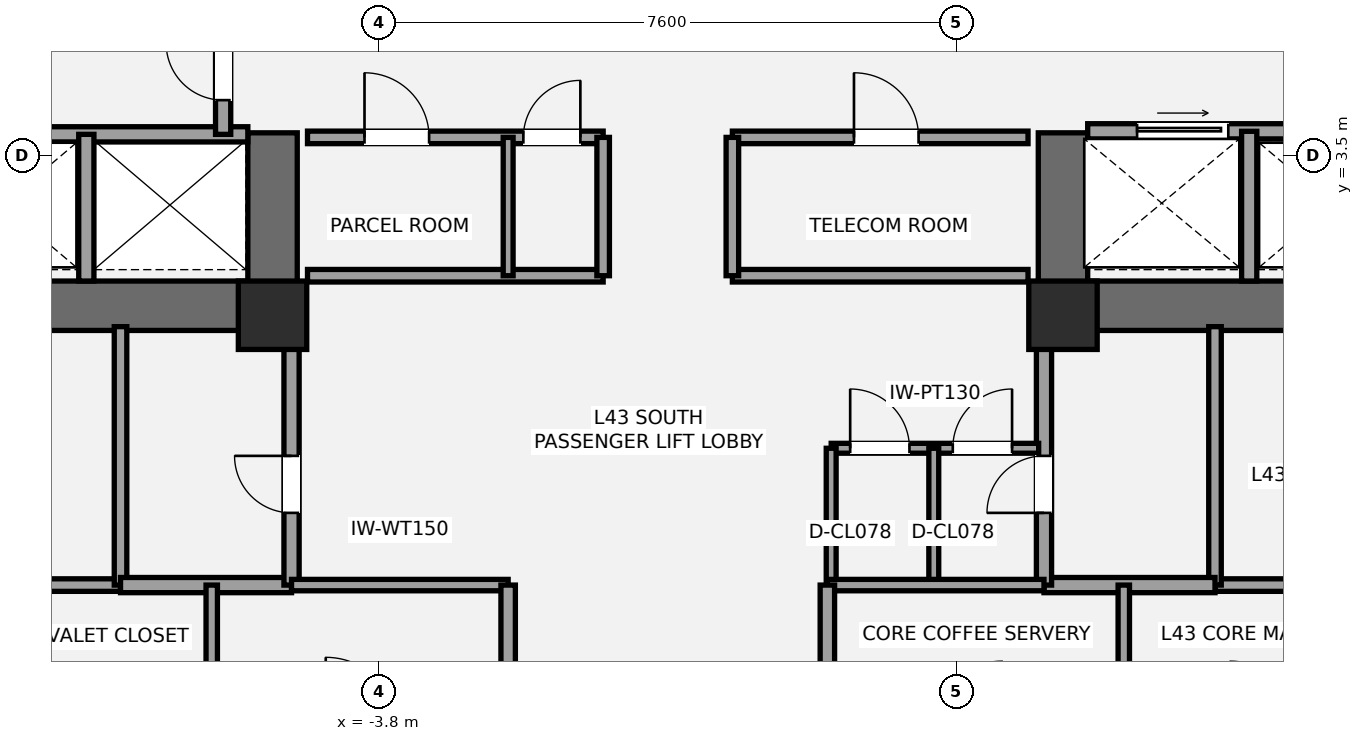
"""IFC4 building model, lengths in metres.
Left out: names, types, materials, properties, quantities, classifications, styles, units other than length and angle.
Written with IfcOpenShell. Run it as: python <this file> out.ifc"""

import sys

from ifc_helpers import new_model, si_unit, direction, frame, frame_2d, origin, origin_2d, place, context, subcontext, project, spatial, rectangle, extrude, element, fill, save


model = new_model("IFC4")
c1 = context("Model", 3, precision=1e-05, world=origin(), true_north=direction((0.0, 1.0)))
c2 = subcontext(c1, "Body", "Model", "MODEL_VIEW")
j1 = project(units=[si_unit("LENGTHUNIT", "METRE"), si_unit("PLANEANGLEUNIT", "RADIAN")], contexts=[c1])
p1 = place(None, origin())
s1 = spatial("IfcSite", under=j1, at=p1, CompositionType="ELEMENT")
p2 = place(p1, origin())
s2 = spatial("IfcBuilding", under=s1, at=p2, CompositionType="ELEMENT")
p3 = place(p2, frame((0.0, 0.0, 159.8)))
s3 = spatial("IfcBuildingStorey", under=s2, at=p3, CompositionType="ELEMENT", Elevation=159.8)
p4 = place(p3, frame((-4.875, 1.525, 0.0), z_axis=(0.0, 0.0, 1.0), x_axis=(-1.0, 0.0, 0.0)))
e1 = element("IfcWall", 1, at=p4, inside=s3, PredefinedType="SHEAR", context=c2, shape_type="SweptSolid", body=[
    extrude(rectangle(XDim=8.925, YDim=0.65, at=frame_2d((4.462, 0.0))), origin(), (0.0, 0.0, 1.0), 3.2),
])
p5 = place(p4, frame((5.425, 0.0, 0.0)))
e2 = element("IfcOpeningElement", 2, at=p5, cuts=e1, PredefinedType="OPENING", context=c2, shape_type="SweptSolid", body=[
    extrude(rectangle(XDim=1.05, YDim=2.15, at=frame_2d((0.525, 1.075))), frame((0.0, 0.335, 0.0), z_axis=(0.0, -1.0, 0.0), x_axis=(1.0, 0.0, 0.0)), (0.0, 0.0, 1.0), 0.67),
])
p6 = place(p4, frame((3.755, 0.0, 0.0)))
e3 = element("IfcOpeningElement", 3, at=p6, cuts=e1, PredefinedType="OPENING", context=c2, shape_type="SweptSolid", body=[
    extrude(rectangle(XDim=1.1, YDim=2.2, at=frame_2d((0.55, 1.1))), frame((0.0, 0.335, 0.0), z_axis=(0.0, -1.0, 0.0), x_axis=(1.0, 0.0, 0.0)), (0.0, 0.0, 1.0), 0.67),
])
p7 = place(p3, frame((-5.2, 1.2, 0.0), z_axis=(0.0, 0.0, 1.0), x_axis=(0.0, 1.0, 0.0)))
e4 = element("IfcWall", 4, at=p7, inside=s3, PredefinedType="SHEAR", context=c2, shape_type="SweptSolid", body=[
    extrude(rectangle(XDim=2.6, YDim=0.65, at=frame_2d((1.3, 0.0))), origin(), (0.0, 0.0, 1.0), 3.2),
])
p8 = place(p3, frame((13.8, 1.525, 0.0), z_axis=(0.0, 0.0, 1.0), x_axis=(-1.0, 0.0, 0.0)))
e5 = element("IfcWall", 5, at=p8, inside=s3, PredefinedType="SHEAR", context=c2, shape_type="SweptSolid", body=[
    extrude(rectangle(XDim=8.925, YDim=0.65, at=frame_2d((4.462, 0.0))), origin(), (0.0, 0.0, 1.0), 3.2),
])
p9 = place(p8, frame((2.45, 0.0, 0.0)))
e6 = element("IfcOpeningElement", 6, at=p9, cuts=e5, PredefinedType="OPENING", context=c2, shape_type="SweptSolid", body=[
    extrude(rectangle(XDim=1.05, YDim=2.15, at=frame_2d((0.525, 1.075))), frame((0.0, 0.335, 0.0), z_axis=(0.0, -1.0, 0.0), x_axis=(1.0, 0.0, 0.0)), (0.0, 0.0, 1.0), 0.67),
])
p10 = place(p8, frame((4.45, 0.0, 0.0)))
e7 = element("IfcOpeningElement", 7, at=p10, cuts=e5, PredefinedType="OPENING", context=c2, shape_type="SweptSolid", body=[
    extrude(rectangle(XDim=1.1, YDim=2.2, at=frame_2d((0.55, 1.1))), frame((0.0, 0.335, 0.0), z_axis=(0.0, -1.0, 0.0), x_axis=(1.0, 0.0, 0.0)), (0.0, 0.0, 1.0), 0.67),
])
p11 = place(p3, frame((5.2, 1.2, 0.0), z_axis=(0.0, 0.0, 1.0), x_axis=(0.0, 1.0, 0.0)))
e8 = element("IfcWall", 8, at=p11, inside=s3, PredefinedType="SHEAR", context=c2, shape_type="SweptSolid", body=[
    extrude(rectangle(XDim=2.6, YDim=0.65, at=frame_2d((1.3, 0.0))), origin(), (0.0, 0.0, 1.0), 3.2),
])
for number, where, z_axis, x_axis in (
    (9, (-5.2, 1.4, 0.0), (0.0, 0.0, 1.0), (1.0, 0.0, 0.0)),
    (10, (5.2, 1.4, 0.0), (0.0, 0.0, 1.0), (1.0, 0.0, 0.0)),
):
    element("IfcColumn", number, at=place(p3, frame(where, z_axis=z_axis, x_axis=x_axis)), inside=s3, PredefinedType="COLUMN", context=c2, shape_type="SweptSolid", body=[
        extrude(rectangle(XDim=0.9, YDim=0.9, at=origin_2d()), origin(), (0.0, 0.0, 1.0), 3.2),
    ])
p12 = place(p3, frame((-13.45, -2.15, 0.0), z_axis=(0.0, 0.0, 1.0), x_axis=(1.0, 0.0, 0.0)))
e11 = element("IfcWall", 11, at=p12, inside=s3, PredefinedType="PARTITIONING", context=c2, shape_type="SweptSolid", body=[
    extrude(rectangle(XDim=6.25, YDim=0.165, at=frame_2d((3.125, 0.0))), origin(), (0.0, 0.0, 1.0), 3.02),
])
p13 = place(p3, frame((-7.2, -2.15, 0.0), z_axis=(0.0, 0.0, 1.0), x_axis=(0.0, 1.0, 0.0)))
e12 = element("IfcWall", 12, at=p13, inside=s3, PredefinedType="PARTITIONING", context=c2, shape_type="SweptSolid", body=[
    extrude(rectangle(XDim=3.4, YDim=0.165, at=frame_2d((1.7, 0.0))), origin(), (0.0, 0.0, 1.0), 2.473),
])
p14 = place(p3, frame((-7.2, -2.15, 0.0), z_axis=(0.0, 0.0, 1.0), x_axis=(1.0, 0.0, 0.0)))
e13 = element("IfcWall", 13, at=p14, inside=s3, PredefinedType="SOLIDWALL", context=c2, shape_type="SweptSolid", body=[
    extrude(rectangle(XDim=2.25, YDim=0.2, at=frame_2d((1.125, 0.0))), origin(), (0.0, 0.0, 1.0), 3.02),
])
p15 = place(p3, frame((-4.95, -2.15, 0.0), z_axis=(0.0, 0.0, 1.0), x_axis=(0.0, 1.0, 0.0)))
e14 = element("IfcWall", 14, at=p15, inside=s3, PredefinedType="SOLIDWALL", context=c2, shape_type="SweptSolid", body=[
    extrude(rectangle(XDim=3.4, YDim=0.2, at=frame_2d((1.7, 0.0))), origin(), (0.0, 0.0, 1.0), 2.473),
])
p16 = place(p15, frame((0.95, 0.0, 0.0)))
e15 = element("IfcOpeningElement", 15, at=p16, cuts=e14, PredefinedType="OPENING", context=c2, shape_type="SweptSolid", body=[
    extrude(rectangle(XDim=0.75, YDim=2.1, at=frame_2d((0.375, 1.05))), frame((0.0, 0.11, 0.0), z_axis=(0.0, -1.0, 0.0), x_axis=(1.0, 0.0, 0.0)), (0.0, 0.0, 1.0), 0.22),
])
p17 = place(p3, frame((7.2, -2.15, 0.0), z_axis=(0.0, 0.0, 1.0), x_axis=(1.0, 0.0, 0.0)))
e16 = element("IfcWall", 16, at=p17, inside=s3, PredefinedType="PARTITIONING", context=c2, shape_type="SweptSolid", body=[
    extrude(rectangle(XDim=6.25, YDim=0.165, at=frame_2d((3.125, 0.0))), origin(), (0.0, 0.0, 1.0), 3.02),
])
p18 = place(p3, frame((7.2, -2.15, 0.0), z_axis=(0.0, 0.0, 1.0), x_axis=(0.0, 1.0, 0.0)))
e17 = element("IfcWall", 17, at=p18, inside=s3, PredefinedType="PARTITIONING", context=c2, shape_type="SweptSolid", body=[
    extrude(rectangle(XDim=3.4, YDim=0.165, at=frame_2d((1.7, 0.0))), origin(), (0.0, 0.0, 1.0), 2.473),
])
p19 = place(p3, frame((4.95, -2.15, 0.0), z_axis=(0.0, 0.0, 1.0), x_axis=(1.0, 0.0, 0.0)))
e18 = element("IfcWall", 18, at=p19, inside=s3, PredefinedType="SOLIDWALL", context=c2, shape_type="SweptSolid", body=[
    extrude(rectangle(XDim=2.25, YDim=0.2, at=frame_2d((1.125, 0.0))), origin(), (0.0, 0.0, 1.0), 3.02),
])
p20 = place(p3, frame((4.95, -2.15, 0.0), z_axis=(0.0, 0.0, 1.0), x_axis=(0.0, 1.0, 0.0)))
e19 = element("IfcWall", 19, at=p20, inside=s3, PredefinedType="SOLIDWALL", context=c2, shape_type="SweptSolid", body=[
    extrude(rectangle(XDim=3.4, YDim=0.2, at=frame_2d((1.7, 0.0))), origin(), (0.0, 0.0, 1.0), 2.473),
])
p21 = place(p20, frame((0.95, 0.0, 0.0)))
e20 = element("IfcOpeningElement", 20, at=p21, cuts=e19, PredefinedType="OPENING", context=c2, shape_type="SweptSolid", body=[
    extrude(rectangle(XDim=0.75, YDim=2.1, at=frame_2d((0.375, 1.05))), frame((0.0, 0.11, 0.0), z_axis=(0.0, -1.0, 0.0), x_axis=(1.0, 0.0, 0.0)), (0.0, 0.0, 1.0), 0.22),
])
p22 = place(p3, frame((2.15, -0.35, 0.0), z_axis=(0.0, 0.0, 1.0), x_axis=(1.0, 0.0, 0.0)))
e21 = element("IfcWall", 21, at=p22, inside=s3, PredefinedType="PARTITIONING", context=c2, shape_type="SweptSolid", body=[
    extrude(rectangle(XDim=2.73, YDim=0.13, at=frame_2d((1.365, 0.0))), origin(), (0.0, 0.0, 1.0), 3.02),
])
p23 = place(p22, frame((0.25, 0.0, 0.0)))
e22 = element("IfcOpeningElement", 22, at=p23, cuts=e21, PredefinedType="OPENING", context=c2, shape_type="SweptSolid", body=[
    extrude(rectangle(XDim=0.78, YDim=2.1, at=frame_2d((0.39, 1.05))), frame((0.0, 0.075, 0.0), z_axis=(0.0, -1.0, 0.0), x_axis=(1.0, 0.0, 0.0)), (0.0, 0.0, 1.0), 0.15),
])
p24 = place(p22, frame((1.6, 0.0, 0.0)))
e23 = element("IfcOpeningElement", 23, at=p24, cuts=e21, PredefinedType="OPENING", context=c2, shape_type="SweptSolid", body=[
    extrude(rectangle(XDim=0.78, YDim=2.1, at=frame_2d((0.39, 1.05))), frame((0.0, 0.075, 0.0), z_axis=(0.0, -1.0, 0.0), x_axis=(1.0, 0.0, 0.0)), (0.0, 0.0, 1.0), 0.15),
])
p25 = place(p3, frame((2.15, -2.15, 0.0), z_axis=(0.0, 0.0, 1.0), x_axis=(0.0, 1.0, 0.0)))
e24 = element("IfcWall", 24, at=p25, inside=s3, PredefinedType="PARTITIONING", context=c2, shape_type="SweptSolid", body=[
    extrude(rectangle(XDim=1.8, YDim=0.13, at=frame_2d((0.9, 0.0))), origin(), (0.0, 0.0, 1.0), 3.02),
])
p26 = place(p3, frame((3.5, -2.15, 0.0), z_axis=(0.0, 0.0, 1.0), x_axis=(0.0, 1.0, 0.0)))
e25 = element("IfcWall", 25, at=p26, inside=s3, PredefinedType="PARTITIONING", context=c2, shape_type="SweptSolid", body=[
    extrude(rectangle(XDim=1.8, YDim=0.13, at=frame_2d((0.9, 0.0))), origin(), (0.0, 0.0, 1.0), 2.473),
])
p27 = place(p3, frame((-9.78, 3.78, 0.0), z_axis=(0.0, 0.0, 1.0), x_axis=(1.0, 0.0, 0.0)))
e26 = element("IfcWall", 26, at=p27, inside=s3, PredefinedType="SOLIDWALL", context=c2, shape_type="SweptSolid", body=[
    extrude(rectangle(XDim=4.255, YDim=0.2, at=frame_2d((2.127, 0.0))), origin(), (0.0, 0.0, 1.0), 3.02),
])
p28 = place(p3, frame((-7.65, 1.85, 0.0), z_axis=(0.0, 0.0, 1.0), x_axis=(0.0, 1.0, 0.0)))
e27 = element("IfcWall", 27, at=p28, inside=s3, PredefinedType="SOLIDWALL", context=c2, shape_type="SweptSolid", body=[
    extrude(rectangle(XDim=1.93, YDim=0.2, at=frame_2d((0.965, 0.0))), origin(), (0.0, 0.0, 1.0), 3.02),
])
p29 = place(p3, frame((-5.85, 3.78, 0.0), z_axis=(0.0, 0.0, 1.0), x_axis=(0.0, 1.0, 0.0)))
e28 = element("IfcWall", 28, at=p29, inside=s3, PredefinedType="SOLIDWALL", context=c2, shape_type="SweptSolid", body=[
    extrude(rectangle(XDim=1.69, YDim=0.2, at=frame_2d((0.845, 0.0))), origin(), (0.0, 0.0, 1.0), 3.02),
])
p30 = place(p29, frame((0.45, 0.0, 0.0)))
e29 = element("IfcOpeningElement", 29, at=p30, cuts=e28, PredefinedType="OPENING", context=c2, shape_type="SweptSolid", body=[
    extrude(rectangle(XDim=0.75, YDim=2.1, at=frame_2d((0.375, 1.05))), frame((0.0, 0.11, 0.0), z_axis=(0.0, -1.0, 0.0), x_axis=(1.0, 0.0, 0.0)), (0.0, 0.0, 1.0), 0.22),
])
p31 = place(p3, frame((5.525, 3.82, 0.0), z_axis=(0.0, 0.0, 1.0), x_axis=(1.0, 0.0, 0.0)))
e30 = element("IfcWall", 30, at=p31, inside=s3, PredefinedType="SOLIDWALL", context=c2, shape_type="SweptSolid", body=[
    extrude(rectangle(XDim=4.255, YDim=0.2, at=frame_2d((2.127, 0.0))), origin(), (0.0, 0.0, 1.0), 3.02),
])
p32 = place(p31, frame((0.65, 0.0, 0.0)))
e31 = element("IfcOpeningElement", 31, at=p32, cuts=e30, PredefinedType="OPENING", context=c2, shape_type="SweptSolid", body=[
    extrude(rectangle(XDim=1.2, YDim=2.2, at=frame_2d((0.6, 1.1))), frame((0.0, 0.11, 0.0), z_axis=(0.0, -1.0, 0.0), x_axis=(1.0, 0.0, 0.0)), (0.0, 0.0, 1.0), 0.22),
])
p33 = place(p3, frame((7.65, 1.85, 0.0), z_axis=(0.0, 0.0, 1.0), x_axis=(0.0, 1.0, 0.0)))
e32 = element("IfcWall", 32, at=p33, inside=s3, PredefinedType="SOLIDWALL", context=c2, shape_type="SweptSolid", body=[
    extrude(rectangle(XDim=1.97, YDim=0.2, at=frame_2d((0.985, 0.0))), origin(), (0.0, 0.0, 1.0), 3.02),
])
p34 = place(p3, frame((-4.74, 1.92, 0.0), z_axis=(0.0, 0.0, 1.0), x_axis=(1.0, 0.0, 0.0)))
e33 = element("IfcWall", 33, at=p34, inside=s3, PredefinedType="PARTITIONING", context=c2, shape_type="SweptSolid", body=[
    extrude(rectangle(XDim=3.89, YDim=0.165, at=frame_2d((1.945, 0.0))), origin(), (0.0, 0.0, 1.0), 2.16),
])
p35 = place(p3, frame((-4.74, 3.74, 0.0), z_axis=(0.0, 0.0, 1.0), x_axis=(1.0, 0.0, 0.0)))
e34 = element("IfcWall", 34, at=p35, inside=s3, PredefinedType="PARTITIONING", context=c2, shape_type="SweptSolid", body=[
    extrude(rectangle(XDim=3.89, YDim=0.165, at=frame_2d((1.945, 0.0))), origin(), (0.0, 0.0, 1.0), 3.02),
])
p36 = place(p35, frame((0.75, 0.0, 0.0)))
e35 = element("IfcOpeningElement", 35, at=p36, cuts=e34, PredefinedType="OPENING", context=c2, shape_type="SweptSolid", body=[
    extrude(rectangle(XDim=0.85, YDim=2.1, at=frame_2d((0.425, 1.05))), frame((0.0, 0.093, 0.0), z_axis=(0.0, -1.0, 0.0), x_axis=(1.0, 0.0, 0.0)), (0.0, 0.0, 1.0), 0.185),
])
p37 = place(p35, frame((2.84, 0.0, 0.0)))
e36 = element("IfcOpeningElement", 36, at=p37, cuts=e34, PredefinedType="OPENING", context=c2, shape_type="SweptSolid", body=[
    extrude(rectangle(XDim=0.75, YDim=2.1, at=frame_2d((0.375, 1.05))), frame((0.0, 0.093, 0.0), z_axis=(0.0, -1.0, 0.0), x_axis=(1.0, 0.0, 0.0)), (0.0, 0.0, 1.0), 0.185),
])
p38 = place(p3, frame((-0.85, 1.92, 0.0), z_axis=(0.0, 0.0, 1.0), x_axis=(0.0, 1.0, 0.0)))
e37 = element("IfcWall", 37, at=p38, inside=s3, PredefinedType="PARTITIONING", context=c2, shape_type="SweptSolid", body=[
    extrude(rectangle(XDim=1.82, YDim=0.165, at=frame_2d((0.91, 0.0))), origin(), (0.0, 0.0, 1.0), 3.02),
])
p39 = place(p3, frame((0.85, 1.92, 0.0), z_axis=(0.0, 0.0, 1.0), x_axis=(1.0, 0.0, 0.0)))
e38 = element("IfcWall", 38, at=p39, inside=s3, PredefinedType="PARTITIONING", context=c2, shape_type="SweptSolid", body=[
    extrude(rectangle(XDim=3.89, YDim=0.165, at=frame_2d((1.945, 0.0))), origin(), (0.0, 0.0, 1.0), 2.16),
])
p40 = place(p3, frame((0.85, 3.74, 0.0), z_axis=(0.0, 0.0, 1.0), x_axis=(1.0, 0.0, 0.0)))
e39 = element("IfcWall", 39, at=p40, inside=s3, PredefinedType="PARTITIONING", context=c2, shape_type="SweptSolid", body=[
    extrude(rectangle(XDim=3.89, YDim=0.165, at=frame_2d((1.945, 0.0))), origin(), (0.0, 0.0, 1.0), 3.02),
])
p41 = place(p40, frame((1.6, 0.0, 0.0)))
e40 = element("IfcOpeningElement", 40, at=p41, cuts=e39, PredefinedType="OPENING", context=c2, shape_type="SweptSolid", body=[
    extrude(rectangle(XDim=0.85, YDim=2.1, at=frame_2d((0.425, 1.05))), frame((0.0, 0.093, 0.0), z_axis=(0.0, -1.0, 0.0), x_axis=(1.0, 0.0, 0.0)), (0.0, 0.0, 1.0), 0.185),
])
p42 = place(p3, frame((0.85, 1.92, 0.0), z_axis=(0.0, 0.0, 1.0), x_axis=(0.0, 1.0, 0.0)))
e41 = element("IfcWall", 41, at=p42, inside=s3, PredefinedType="PARTITIONING", context=c2, shape_type="SweptSolid", body=[
    extrude(rectangle(XDim=1.82, YDim=0.165, at=frame_2d((0.91, 0.0))), origin(), (0.0, 0.0, 1.0), 3.02),
])
p43 = place(p3, frame((-2.1, 1.92, 0.0), z_axis=(0.0, 0.0, 1.0), x_axis=(0.0, 1.0, 0.0)))
e42 = element("IfcWall", 42, at=p43, inside=s3, PredefinedType="PARTITIONING", context=c2, shape_type="SweptSolid", body=[
    extrude(rectangle(XDim=1.82, YDim=0.13, at=frame_2d((0.91, 0.0))), origin(), (0.0, 0.0, 1.0), 3.02),
])
p44 = place(p3, frame((-4.95, -2.15, 0.0), z_axis=(0.0, 0.0, 1.0), x_axis=(1.0, 0.0, 0.0)))
e43 = element("IfcWall", 43, at=p44, inside=s3, PredefinedType="PLUMBINGWALL", context=c2, shape_type="SweptSolid", body=[
    extrude(rectangle(XDim=2.85, YDim=0.15, at=frame_2d((1.425, 0.0))), origin(), (0.0, 0.0, 1.0), 2.473),
])
p45 = place(p3, frame((-2.1, -4.05, 0.0), z_axis=(0.0, 0.0, 1.0), x_axis=(0.0, 1.0, 0.0)))
e44 = element("IfcWall", 44, at=p45, inside=s3, PredefinedType="PLUMBINGWALL", context=c2, shape_type="SweptSolid", body=[
    extrude(rectangle(XDim=1.9, YDim=0.19, at=frame_2d((0.95, 0.0))), origin(), (0.0, 0.0, 1.0), 2.473),
])
p46 = place(p3, frame((-6.0, -4.05, 0.0), z_axis=(0.0, 0.0, 1.0), x_axis=(0.0, 1.0, 0.0)))
e45 = element("IfcWall", 45, at=p46, inside=s3, PredefinedType="PLUMBINGWALL", context=c2, shape_type="SweptSolid", body=[
    extrude(rectangle(XDim=1.9, YDim=0.15, at=frame_2d((0.95, 0.0))), origin(), (0.0, 0.0, 1.0), 2.473),
])
p47 = place(p3, frame((2.1, -2.15, 0.0), z_axis=(0.0, 0.0, 1.0), x_axis=(1.0, 0.0, 0.0)))
e46 = element("IfcWall", 46, at=p47, inside=s3, PredefinedType="PLUMBINGWALL", context=c2, shape_type="SweptSolid", body=[
    extrude(rectangle(XDim=2.85, YDim=0.15, at=frame_2d((1.425, 0.0))), origin(), (0.0, 0.0, 1.0), 3.02),
])
p48 = place(p3, frame((2.1, -4.05, 0.0), z_axis=(0.0, 0.0, 1.0), x_axis=(0.0, 1.0, 0.0)))
e47 = element("IfcWall", 47, at=p48, inside=s3, PredefinedType="PLUMBINGWALL", context=c2, shape_type="SweptSolid", body=[
    extrude(rectangle(XDim=1.9, YDim=0.19, at=frame_2d((0.95, 0.0))), origin(), (0.0, 0.0, 1.0), 2.473),
])
p49 = place(p3, frame((6.0, -4.05, 0.0), z_axis=(0.0, 0.0, 1.0), x_axis=(0.0, 1.0, 0.0)))
e48 = element("IfcWall", 48, at=p49, inside=s3, PredefinedType="PLUMBINGWALL", context=c2, shape_type="SweptSolid", body=[
    extrude(rectangle(XDim=1.9, YDim=0.15, at=frame_2d((0.95, 0.0))), origin(), (0.0, 0.0, 1.0), 2.473),
])
p50 = place(p16, origin())
e49 = element("IfcDoor", 49, at=p50, inside=s3, OperationType="SINGLE_SWING_RIGHT", PredefinedType="DOOR", context=c2, shape_type="SweptSolid", body=[
    extrude(rectangle(XDim=0.75, YDim=2.1, at=frame_2d((0.375, 1.05))), frame((0.0, 0.025, 0.0), z_axis=(0.0, -1.0, 0.0), x_axis=(1.0, 0.0, 0.0)), (0.0, 0.0, 1.0), 0.05),
])
fill(e15, e49)
p51 = place(p21, origin())
e50 = element("IfcDoor", 50, at=p51, inside=s3, OperationType="SINGLE_SWING_LEFT", PredefinedType="DOOR", context=c2, shape_type="SweptSolid", body=[
    extrude(rectangle(XDim=0.75, YDim=2.1, at=frame_2d((0.375, 1.05))), frame((0.0, 0.025, 0.0), z_axis=(0.0, -1.0, 0.0), x_axis=(1.0, 0.0, 0.0)), (0.0, 0.0, 1.0), 0.05),
])
fill(e20, e50)
p52 = place(p23, origin())
e51 = element("IfcDoor", 51, at=p52, inside=s3, OperationType="SINGLE_SWING_LEFT", PredefinedType="DOOR", context=c2, shape_type="SweptSolid", body=[
    extrude(rectangle(XDim=0.78, YDim=2.1, at=frame_2d((0.39, 1.05))), frame((0.0, 0.025, 0.0), z_axis=(0.0, -1.0, 0.0), x_axis=(1.0, 0.0, 0.0)), (0.0, 0.0, 1.0), 0.05),
])
fill(e22, e51)
p53 = place(p24, origin())
e52 = element("IfcDoor", 52, at=p53, inside=s3, OperationType="SINGLE_SWING_RIGHT", PredefinedType="DOOR", context=c2, shape_type="SweptSolid", body=[
    extrude(rectangle(XDim=0.78, YDim=2.1, at=frame_2d((0.39, 1.05))), frame((0.0, 0.025, 0.0), z_axis=(0.0, -1.0, 0.0), x_axis=(1.0, 0.0, 0.0)), (0.0, 0.0, 1.0), 0.05),
])
fill(e23, e52)
p54 = place(p30, origin())
e53 = element("IfcDoor", 53, at=p54, inside=s3, OperationType="SINGLE_SWING_RIGHT", PredefinedType="DOOR", context=c2, shape_type="SweptSolid", body=[
    extrude(rectangle(XDim=0.75, YDim=2.1, at=frame_2d((0.375, 1.05))), frame((0.0, 0.025, 0.0), z_axis=(0.0, -1.0, 0.0), x_axis=(1.0, 0.0, 0.0)), (0.0, 0.0, 1.0), 0.05),
])
fill(e29, e53)
p55 = place(p32, origin())
e54 = element("IfcDoor", 54, at=p55, inside=s3, OperationType="SLIDING_TO_RIGHT", PredefinedType="DOOR", context=c2, shape_type="SweptSolid", body=[
    extrude(rectangle(XDim=1.2, YDim=2.2, at=frame_2d((0.6, 1.1))), frame((0.0, 0.025, 0.0), z_axis=(0.0, -1.0, 0.0), x_axis=(1.0, 0.0, 0.0)), (0.0, 0.0, 1.0), 0.05),
])
fill(e31, e54)
p56 = place(p36, origin())
e55 = element("IfcDoor", 55, at=p56, inside=s3, OperationType="SINGLE_SWING_LEFT", PredefinedType="DOOR", context=c2, shape_type="SweptSolid", body=[
    extrude(rectangle(XDim=0.85, YDim=2.1, at=frame_2d((0.425, 1.05))), frame((0.0, 0.025, 0.0), z_axis=(0.0, -1.0, 0.0), x_axis=(1.0, 0.0, 0.0)), (0.0, 0.0, 1.0), 0.05),
])
fill(e35, e55)
p57 = place(p37, origin())
e56 = element("IfcDoor", 56, at=p57, inside=s3, OperationType="SINGLE_SWING_RIGHT", PredefinedType="DOOR", context=c2, shape_type="SweptSolid", body=[
    extrude(rectangle(XDim=0.75, YDim=2.1, at=frame_2d((0.375, 1.05))), frame((0.0, 0.025, 0.0), z_axis=(0.0, -1.0, 0.0), x_axis=(1.0, 0.0, 0.0)), (0.0, 0.0, 1.0), 0.05),
])
fill(e36, e56)
p58 = place(p41, origin())
e57 = element("IfcDoor", 57, at=p58, inside=s3, OperationType="SINGLE_SWING_LEFT", PredefinedType="DOOR", context=c2, shape_type="SweptSolid", body=[
    extrude(rectangle(XDim=0.85, YDim=2.1, at=frame_2d((0.425, 1.05))), frame((0.0, 0.025, 0.0), z_axis=(0.0, -1.0, 0.0), x_axis=(1.0, 0.0, 0.0)), (0.0, 0.0, 1.0), 0.05),
])
fill(e40, e57)
save(model, sys.argv[1])
